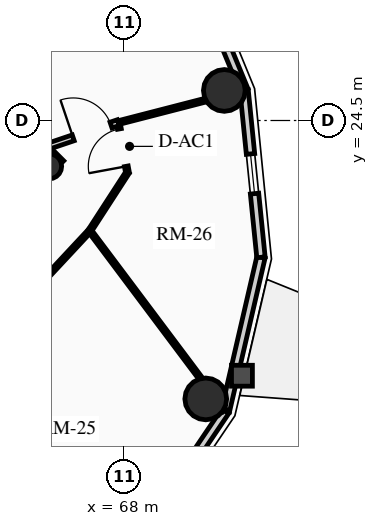
"""IFC4 building model, lengths in metres.
Left out: names, types, materials, properties, quantities, classifications, styles, units other than length and angle.
Written with IfcOpenShell. Run it as: python <this file> out.ifc"""

import sys

from ifc_helpers import new_model, si_unit, direction, frame, frame_2d, origin, origin_2d, place, context, subcontext, project, spatial, rectangle, circle, hollow_circle, extrude, source, transform, mapped, element, fill, save


model = new_model("IFC4")
c1 = context("Model", 3, precision=1e-05, world=origin(), true_north=direction((0.0, 1.0)))
c2 = subcontext(c1, "Body", "Model", "MODEL_VIEW")
j1 = project(units=[si_unit("LENGTHUNIT", "METRE"), si_unit("PLANEANGLEUNIT", "RADIAN")], contexts=[c1])
p1 = place(None, origin())
s1 = spatial("IfcSite", under=j1, at=p1, CompositionType="ELEMENT")
p2 = place(p1, origin())
s2 = spatial("IfcBuilding", under=s1, at=p2, CompositionType="ELEMENT")
p3 = place(p2, frame((0.0, 0.0, 199.57)))
s3 = spatial("IfcBuildingStorey", under=s2, at=p3, CompositionType="ELEMENT", Elevation=199.57)
p4 = place(p3, frame((66.268, 23.298, 0.0), z_axis=(0.0, 0.0, 1.0), x_axis=(-0.707106781187, 0.707106781187, 0.0)))
e1 = element("IfcWall", 1, at=p4, inside=s3, PredefinedType="SHEAR", context=c2, shape_type="SweptSolid", body=[
    extrude(rectangle(XDim=14.1, YDim=0.4, at=frame_2d((7.05, 0.0))), origin(), (0.0, 0.0, 1.0), 2.91),
])
p5 = place(p3, frame((58.561, 15.873, 0.0), z_axis=(0.0, 0.0, 1.0), x_axis=(0.707106781187, 0.707106781187, 0.0)))
e2 = element("IfcWall", 2, at=p5, inside=s3, PredefinedType="SHEAR", context=c2, shape_type="SweptSolid", body=[
    extrude(rectangle(XDim=10.7, YDim=0.4, at=frame_2d((5.35, 0.0))), origin(), (0.0, 0.0, 1.0), 2.91),
])
m1 = source(origin(), c2, "Body", "SweptSolid", [
    extrude(rectangle(XDim=1.5, YDim=2.02, at=frame_2d((0.75, 1.01))), frame((0.0, 0.21, 0.0), z_axis=(0.0, -1.0, 0.0), x_axis=(1.0, 0.0, 0.0)), (0.0, 0.0, 1.0), 0.42),
])
p6 = place(p5, frame((5.45, 0.0, 0.0)))
e3 = element("IfcOpeningElement", 3, at=p6, cuts=e2, PredefinedType="OPENING", context=c2, shape_type="MappedRepresentation", body=[
    mapped(m1, transform((0.0, 0.0, 0.0), x_axis=(1.0, 0.0, 0.0), y_axis=(0.0, 1.0, 0.0), z_axis=(0.0, 0.0, 1.0), scale=1.0)),
])
p7 = place(p3, frame((66.024, 23.294, 0.0), z_axis=(0.0, 0.0, 1.0), x_axis=(0.707106781187, 0.707106781187, 0.0)))
e4 = element("IfcColumn", 4, at=p7, inside=s3, PredefinedType="COLUMN", context=c2, shape_type="SweptSolid", body=[
    extrude(hollow_circle(Radius=0.33, WallThickness=0.025, at=origin_2d()), origin(), (0.0, 0.0, 1.0), 2.91),
])
for number, where, z_axis, x_axis in (
    (5, (70.146, 17.173, 0.0), (0.0, 0.0, 1.0), (1.0, 0.0, 0.0)),
    (6, (70.635, 25.291, 0.0), (0.0, 0.0, 1.0), (1.0, 0.0, 0.0)),
):
    element("IfcColumn", number, at=place(p3, frame(where, z_axis=z_axis, x_axis=x_axis)), inside=s3, PredefinedType="USERDEFINED", context=c2, shape_type="SweptSolid", body=[
        extrude(circle(Radius=0.55, at=origin_2d()), origin(), (0.0, 0.0, 1.0), 2.91),
    ])
p8 = place(p3, frame((70.663, 16.856, 0.0), z_axis=(0.0, 0.0, 1.0), x_axis=(-0.559495003079, -0.828833723692, 0.0)))
e7 = element("IfcWall", 7, at=p8, inside=s3, PredefinedType="SOLIDWALL", context=c2, shape_type="SweptSolid", body=[
    extrude(rectangle(XDim=3.976, YDim=0.22, at=frame_2d((1.988, 0.0))), origin(), (0.0, 0.0, 1.0), 2.322),
])
m2 = source(origin(), c2, "Body", "SweptSolid", [
    extrude(rectangle(XDim=1.05, YDim=1.3, at=frame_2d((0.525, 0.65))), frame((0.0, 0.12, 0.0), z_axis=(0.0, -1.0, 0.0), x_axis=(1.0, 0.0, 0.0)), (0.0, 0.0, 1.0), 0.24),
])
p9 = place(p8, frame((1.463, 0.0, 0.65)))
e8 = element("IfcOpeningElement", 8, at=p9, cuts=e7, PredefinedType="OPENING", context=c2, shape_type="MappedRepresentation", body=[
    mapped(m2, transform((0.0, 0.0, 0.0), x_axis=(1.0, 0.0, 0.0), y_axis=(0.0, 1.0, 0.0), z_axis=(0.0, 0.0, 1.0), scale=1.0)),
])
p10 = place(p3, frame((71.599, 20.9, 0.0), z_axis=(0.0, 0.0, 1.0), x_axis=(-0.225473813158, -0.974249228678, 0.0)))
e9 = element("IfcWall", 9, at=p10, inside=s3, PredefinedType="SOLIDWALL", context=c2, shape_type="SweptSolid", body=[
    extrude(rectangle(XDim=4.15, YDim=0.22, at=frame_2d((2.075, 0.0))), origin(), (0.0, 0.0, 1.0), 2.322),
])
p11 = place(p3, frame((71.155, 25.295, 0.0), z_axis=(0.0, 0.0, 1.0), x_axis=(0.100570534541, -0.994929930991, 0.0)))
e10 = element("IfcWall", 10, at=p11, inside=s3, PredefinedType="SOLIDWALL", context=c2, shape_type="SweptSolid", body=[
    extrude(rectangle(XDim=4.418, YDim=0.22, at=frame_2d((2.209, 0.0))), origin(), (0.0, 0.0, 1.0), 2.322),
])
p12 = place(p11, frame((1.684, 0.0, 0.65)))
e11 = element("IfcOpeningElement", 11, at=p12, cuts=e10, PredefinedType="OPENING", context=c2, shape_type="MappedRepresentation", body=[
    mapped(m2, transform((0.0, 0.0, 0.0), x_axis=(1.0, 0.0, 0.0), y_axis=(0.0, 1.0, 0.0), z_axis=(0.0, 0.0, 1.0), scale=1.0)),
])
p13 = place(p3, frame((69.374, 29.613, 0.0), z_axis=(0.0, 0.0, 1.0), x_axis=(0.381309704956, -0.924447353237, 0.0)))
e12 = element("IfcWall", 12, at=p13, inside=s3, PredefinedType="SOLIDWALL", context=c2, shape_type="SweptSolid", body=[
    extrude(rectangle(XDim=4.671, YDim=0.22, at=frame_2d((2.335, 0.0))), origin(), (0.0, 0.0, 1.0), 2.322),
])
p14 = place(p3, frame((62.736, 16.924, 0.0), z_axis=(0.0, 0.0, 1.0), x_axis=(0.681946700833, 0.731401871219, 0.0)))
e13 = element("IfcWall", 13, at=p14, inside=s3, PredefinedType="MOVABLE", context=c2, shape_type="SweptSolid", body=[
    extrude(rectangle(XDim=6.393, YDim=0.1, at=frame_2d((3.196, 0.0))), origin(), (0.0, 0.0, 1.0), 2.255),
])
p15 = place(p3, frame((67.095, 21.6, 0.0), z_axis=(0.0, 0.0, 1.0), x_axis=(0.543773190184, 0.839232219137, 0.0)))
e14 = element("IfcWall", 14, at=p15, inside=s3, PredefinedType="MOVABLE", context=c2, shape_type="SweptSolid", body=[
    extrude(rectangle(XDim=1.823, YDim=0.1, at=frame_2d((0.911, 0.0))), origin(), (0.0, 0.0, 1.0), 2.255),
])
p16 = place(p3, frame((68.086, 23.129, 0.0), z_axis=(0.0, 0.0, 1.0), x_axis=(-0.182004193146, 0.983297754334, 0.0)))
e15 = element("IfcWall", 15, at=p16, inside=s3, PredefinedType="MOVABLE", context=c2, shape_type="SweptSolid", body=[
    extrude(rectangle(XDim=1.336, YDim=0.1, at=frame_2d((0.668, 0.0))), origin(), (0.0, 0.0, 1.0), 2.322),
])
m3 = source(origin(), c2, "Body", "SweptSolid", [
    extrude(rectangle(XDim=1.0, YDim=2.015, at=frame_2d((0.5, 1.007))), frame((0.0, 0.06, 0.0), z_axis=(0.0, -1.0, 0.0), x_axis=(1.0, 0.0, 0.0)), (0.0, 0.0, 1.0), 0.12),
])
p17 = place(p16, frame((0.168, 0.0, 0.0)))
e16 = element("IfcOpeningElement", 16, at=p17, cuts=e15, PredefinedType="OPENING", context=c2, shape_type="MappedRepresentation", body=[
    mapped(m3, transform((0.0, 0.0, 0.0), x_axis=(1.0, 0.0, 0.0), y_axis=(0.0, 1.0, 0.0), z_axis=(0.0, 0.0, 1.0), scale=1.0)),
])
p18 = place(p3, frame((67.095, 21.6, 0.0), z_axis=(0.0, 0.0, 1.0), x_axis=(0.599947190798, -0.800039604178, 0.0)))
e17 = element("IfcWall", 17, at=p18, inside=s3, PredefinedType="MOVABLE", context=c2, shape_type="SweptSolid", body=[
    extrude(rectangle(XDim=5.918, YDim=0.1, at=frame_2d((2.959, 0.0))), origin(), (0.0, 0.0, 1.0), 2.322),
])
p19 = place(p3, frame((67.843, 24.443, 0.0), z_axis=(0.0, 0.0, 1.0), x_axis=(0.968303102463, 0.249778105048, 0.0)))
e18 = element("IfcWall", 18, at=p19, inside=s3, PredefinedType="MOVABLE", context=c2, shape_type="SweptSolid", body=[
    extrude(rectangle(XDim=3.399, YDim=0.1, at=frame_2d((1.7, 0.0))), origin(), (0.0, 0.0, 1.0), 2.322),
])
p20 = place(p3, frame((66.021, 23.828, 0.0), z_axis=(0.0, 0.0, 1.0), x_axis=(0.947522075691, 0.319690344049, 0.0)))
e19 = element("IfcWall", 19, at=p20, inside=s3, PredefinedType="PARTITIONING", context=c2, shape_type="SweptSolid", body=[
    extrude(rectangle(XDim=1.924, YDim=0.16, at=frame_2d((0.962, 0.0))), origin(), (0.0, 0.0, 1.0), 2.255),
])
m4 = source(origin(), c2, "Body", "SweptSolid", [
    extrude(rectangle(XDim=1.05, YDim=2.015, at=frame_2d((0.525, 1.007))), frame((0.0, 0.09, 0.0), z_axis=(0.0, -1.0, 0.0), x_axis=(1.0, 0.0, 0.0)), (0.0, 0.0, 1.0), 0.18),
])
p21 = place(p20, frame((0.674, 0.0, 0.0)))
e20 = element("IfcOpeningElement", 20, at=p21, cuts=e19, PredefinedType="OPENING", context=c2, shape_type="MappedRepresentation", body=[
    mapped(m4, transform((0.0, 0.0, 0.0), x_axis=(1.0, 0.0, 0.0), y_axis=(0.0, 1.0, 0.0), z_axis=(0.0, 0.0, 1.0), scale=1.0)),
])
m5 = source(origin(), c2, "Body", "SweptSolid", [
    extrude(rectangle(XDim=1.05, YDim=1.3, at=frame_2d((0.525, 0.65))), frame((0.0, 0.03, 0.0), z_axis=(0.0, -1.0, 0.0), x_axis=(1.0, 0.0, 0.0)), (0.0, 0.0, 1.0), 0.06),
])
p22 = place(p12, origin())
e21 = element("IfcWindow", 21, at=p22, inside=s3, PartitioningType="SINGLE_PANEL", PredefinedType="WINDOW", context=c2, shape_type="MappedRepresentation", body=[
    mapped(m5, transform((0.0, 0.0, 0.0), x_axis=(1.0, 0.0, 0.0), y_axis=(0.0, 1.0, 0.0), z_axis=(0.0, 0.0, 1.0), scale=1.0)),
])
fill(e11, e21)
m6 = source(origin(), c2, "Body", "SweptSolid", [
    extrude(rectangle(XDim=1.05, YDim=2.015, at=frame_2d((0.525, 1.007))), frame((0.0, 0.025, 0.0), z_axis=(0.0, -1.0, 0.0), x_axis=(1.0, 0.0, 0.0)), (0.0, 0.0, 1.0), 0.05),
])
p23 = place(p21, origin())
e22 = element("IfcDoor", 22, at=p23, inside=s3, OperationType="SINGLE_SWING_LEFT", PredefinedType="DOOR", context=c2, shape_type="MappedRepresentation", body=[
    mapped(m6, transform((0.0, 0.0, 0.0), x_axis=(1.0, 0.0, 0.0), y_axis=(0.0, 1.0, 0.0), z_axis=(0.0, 0.0, 1.0), scale=1.0)),
])
fill(e20, e22)
m7 = source(origin(), c2, "Body", "SweptSolid", [
    extrude(rectangle(XDim=1.0, YDim=2.015, at=frame_2d((0.5, 1.007))), frame((0.0, 0.025, 0.0), z_axis=(0.0, -1.0, 0.0), x_axis=(1.0, 0.0, 0.0)), (0.0, 0.0, 1.0), 0.05),
])
p24 = place(p17, origin())
e23 = element("IfcDoor", 23, at=p24, inside=s3, OperationType="SINGLE_SWING_LEFT", PredefinedType="DOOR", context=c2, shape_type="MappedRepresentation", body=[
    mapped(m7, transform((0.0, 0.0, 0.0), x_axis=(1.0, 0.0, 0.0), y_axis=(0.0, 1.0, 0.0), z_axis=(0.0, 0.0, 1.0), scale=1.0)),
])
fill(e16, e23)
save(model, sys.argv[1])
